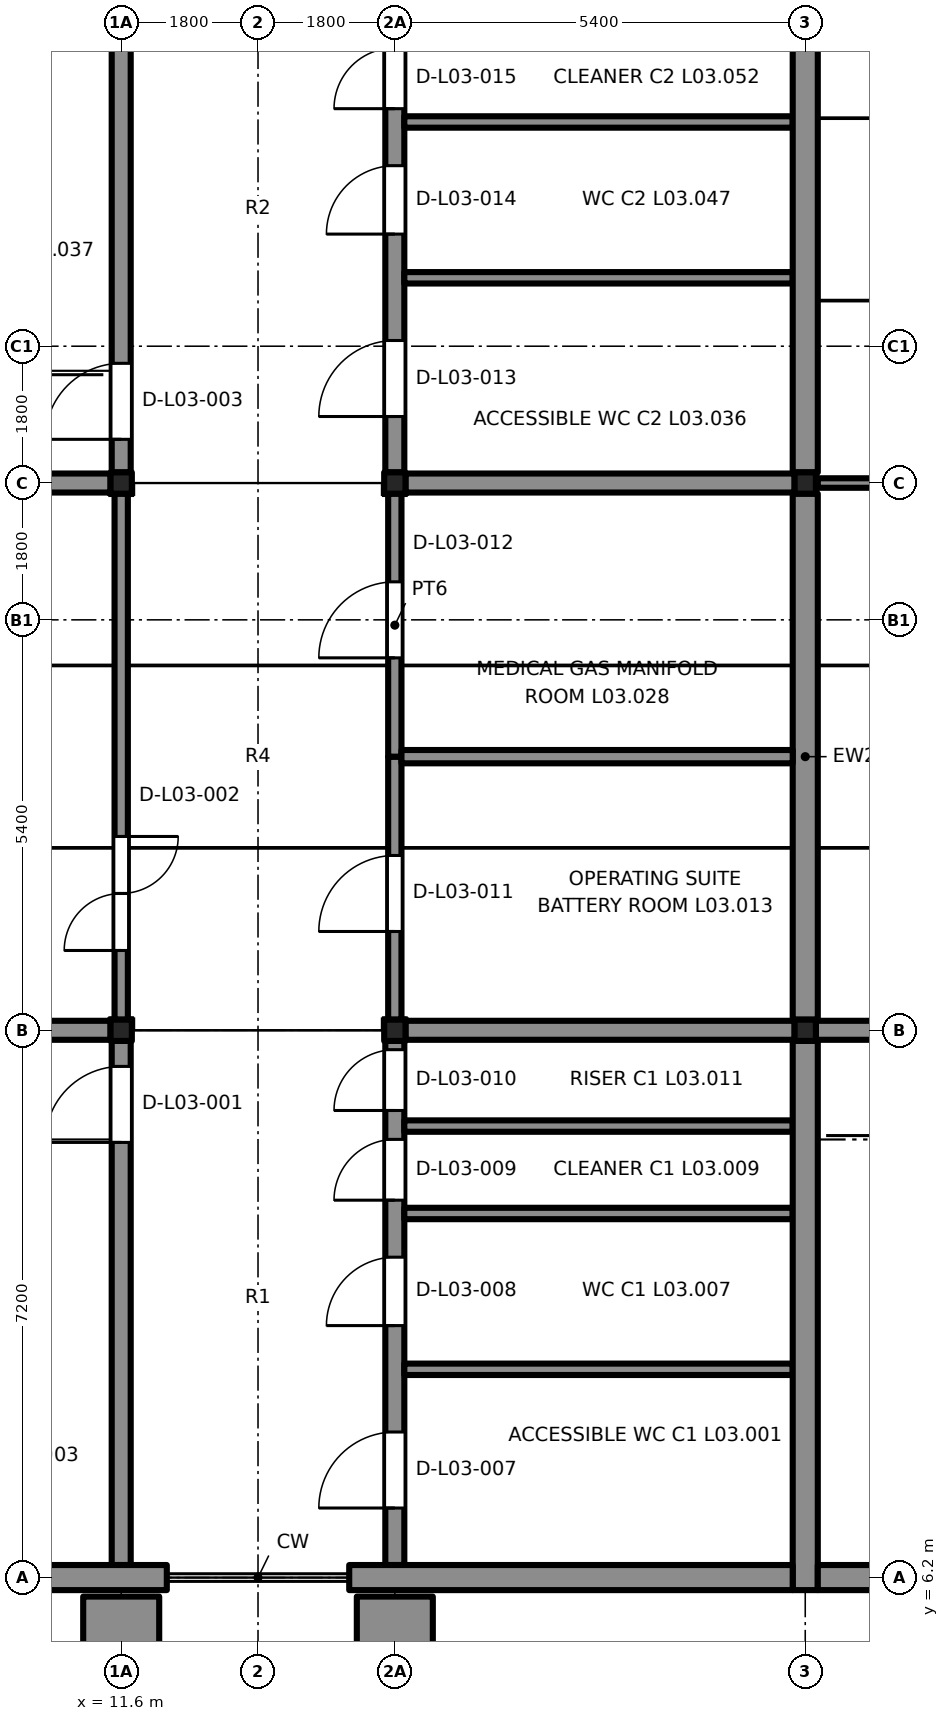
"""IFC4 building model, lengths in metres.
Left out: names, types, materials, properties, quantities, classifications, styles, units other than length and angle.
Written with IfcOpenShell. Run it as: python <this file> out.ifc"""

import sys

from ifc_helpers import new_model, si_unit, direction, frame, frame_2d, origin, origin_2d, place, context, subcontext, project, spatial, rectangle, extrude, element, fill, save


model = new_model("IFC4")
c1 = context("Model", 3, precision=1e-05, world=origin(), true_north=direction((0.0, 1.0)))
c2 = subcontext(c1, "Body", "Model", "MODEL_VIEW")
j1 = project(units=[si_unit("LENGTHUNIT", "METRE"), si_unit("PLANEANGLEUNIT", "RADIAN")], contexts=[c1])
p1 = place(None, origin())
s1 = spatial("IfcSite", under=j1, at=p1, CompositionType="ELEMENT")
p2 = place(p1, origin())
s2 = spatial("IfcBuilding", under=s1, at=p2, CompositionType="ELEMENT")
p3 = place(p2, frame((0.0, 0.0, 14.1)))
s3 = spatial("IfcBuildingStorey", under=s2, at=p3, CompositionType="ELEMENT", Elevation=14.1)
for number, where, z_axis, x_axis in (
    (1, (11.6, 13.4, 0.0), (0.0, 0.0, 1.0), (1.0, 0.0, 0.0)),
    (2, (15.2, 13.4, 0.0), (0.0, 0.0, 1.0), (1.0, 0.0, 0.0)),
    (3, (20.6, 13.4, 0.0), (0.0, 0.0, 1.0), (1.0, 0.0, 0.0)),
    (4, (11.6, 20.6, 0.0), (0.0, 0.0, 1.0), (1.0, 0.0, 0.0)),
    (5, (15.2, 20.6, 0.0), (0.0, 0.0, 1.0), (1.0, 0.0, 0.0)),
    (6, (20.6, 20.6, 0.0), (0.0, 0.0, 1.0), (1.0, 0.0, 0.0)),
):
    element("IfcColumn", number, at=place(p3, frame(where, z_axis=z_axis, x_axis=x_axis)), inside=s3, PredefinedType="COLUMN", context=c2, shape_type="SweptSolid", body=[
        extrude(rectangle(XDim=0.28, YDim=0.28, at=origin_2d()), origin(), (0.0, 0.0, 1.0), 3.9),
    ])
p4 = place(p3, frame((11.6, 6.365, 0.0), z_axis=(0.0, 0.0, 1.0), x_axis=(0.0, 1.0, 0.0)))
e7 = element("IfcWall", 7, at=p4, inside=s3, PredefinedType="SHEAR", context=c2, shape_type="SweptSolid", body=[
    extrude(rectangle(XDim=6.895, YDim=0.25, at=frame_2d((3.448, 0.0))), origin(), (0.0, 0.0, 1.0), 3.2),
])
p5 = place(p4, frame((5.56, 0.0, 0.0)))
e8 = element("IfcOpeningElement", 8, at=p5, cuts=e7, PredefinedType="OPENING", context=c2, shape_type="SweptSolid", body=[
    extrude(rectangle(XDim=1.0, YDim=2.1, at=frame_2d((0.5, 1.05))), frame((0.0, 0.135, 0.0), z_axis=(0.0, -1.0, 0.0), x_axis=(1.0, 0.0, 0.0)), (0.0, 0.0, 1.0), 0.27),
])
p6 = place(p3, frame((6.34, 13.4, 0.0), z_axis=(0.0, 0.0, 1.0), x_axis=(1.0, 0.0, 0.0)))
e9 = element("IfcWall", 9, at=p6, inside=s3, PredefinedType="SHEAR", context=c2, shape_type="SweptSolid", body=[
    extrude(rectangle(XDim=5.12, YDim=0.25, at=frame_2d((2.56, 0.0))), origin(), (0.0, 0.0, 1.0), 3.2),
])
p7 = place(p3, frame((15.2, 6.365, 0.0), z_axis=(0.0, 0.0, 1.0), x_axis=(0.0, 1.0, 0.0)))
e10 = element("IfcWall", 10, at=p7, inside=s3, PredefinedType="SHEAR", context=c2, shape_type="SweptSolid", body=[
    extrude(rectangle(XDim=6.895, YDim=0.25, at=frame_2d((3.448, 0.0))), origin(), (0.0, 0.0, 1.0), 3.2),
])
p8 = place(p7, frame((0.75, 0.0, 0.0)))
e11 = element("IfcOpeningElement", 11, at=p8, cuts=e10, PredefinedType="OPENING", context=c2, shape_type="SweptSolid", body=[
    extrude(rectangle(XDim=1.0, YDim=2.1, at=frame_2d((0.5, 1.05))), frame((0.0, 0.135, 0.0), z_axis=(0.0, -1.0, 0.0), x_axis=(1.0, 0.0, 0.0)), (0.0, 0.0, 1.0), 0.27),
])
p9 = place(p7, frame((3.15, 0.0, 0.0)))
e12 = element("IfcOpeningElement", 12, at=p9, cuts=e10, PredefinedType="OPENING", context=c2, shape_type="SweptSolid", body=[
    extrude(rectangle(XDim=0.9, YDim=2.1, at=frame_2d((0.45, 1.05))), frame((0.0, 0.135, 0.0), z_axis=(0.0, -1.0, 0.0), x_axis=(1.0, 0.0, 0.0)), (0.0, 0.0, 1.0), 0.27),
])
p10 = place(p7, frame((4.8, 0.0, 0.0)))
e13 = element("IfcOpeningElement", 13, at=p10, cuts=e10, PredefinedType="OPENING", context=c2, shape_type="SweptSolid", body=[
    extrude(rectangle(XDim=0.8, YDim=2.1, at=frame_2d((0.4, 1.05))), frame((0.0, 0.135, 0.0), z_axis=(0.0, -1.0, 0.0), x_axis=(1.0, 0.0, 0.0)), (0.0, 0.0, 1.0), 0.27),
])
p11 = place(p7, frame((5.98, 0.0, 0.0)))
e14 = element("IfcOpeningElement", 14, at=p11, cuts=e10, PredefinedType="OPENING", context=c2, shape_type="SweptSolid", body=[
    extrude(rectangle(XDim=0.8, YDim=2.1, at=frame_2d((0.4, 1.05))), frame((0.0, 0.135, 0.0), z_axis=(0.0, -1.0, 0.0), x_axis=(1.0, 0.0, 0.0)), (0.0, 0.0, 1.0), 0.27),
])
p12 = place(p3, frame((15.34, 13.4, 0.0), z_axis=(0.0, 0.0, 1.0), x_axis=(1.0, 0.0, 0.0)))
e15 = element("IfcWall", 15, at=p12, inside=s3, PredefinedType="SHEAR", context=c2, shape_type="SweptSolid", body=[
    extrude(rectangle(XDim=5.12, YDim=0.25, at=frame_2d((2.56, 0.0))), origin(), (0.0, 0.0, 1.0), 3.2),
])
for number, where, z_axis, x_axis in (
    (16, (15.325, 8.94, 0.0), (0.0, 0.0, 1.0), (1.0, 0.0, 0.0)),
    (17, (15.325, 10.99, 0.0), (0.0, 0.0, 1.0), (1.0, 0.0, 0.0)),
    (18, (15.325, 12.14, 0.0), (0.0, 0.0, 1.0), (1.0, 0.0, 0.0)),
):
    element("IfcWall", number, at=place(p3, frame(where, z_axis=z_axis, x_axis=x_axis)), inside=s3, PredefinedType="PARTITIONING", context=c2, shape_type="SweptSolid", body=[
        extrude(rectangle(XDim=5.11, YDim=0.15, at=frame_2d((2.555, 0.0))), origin(), (0.0, 0.0, 1.0), 3.2),
    ])
p13 = place(p3, frame((11.6, 20.74, 0.0), z_axis=(0.0, 0.0, 1.0), x_axis=(0.0, 1.0, 0.0)))
e19 = element("IfcWall", 19, at=p13, inside=s3, PredefinedType="SHEAR", context=c2, shape_type="SweptSolid", body=[
    extrude(rectangle(XDim=6.92, YDim=0.25, at=frame_2d((3.46, 0.0))), origin(), (0.0, 0.0, 1.0), 3.2),
])
p14 = place(p13, frame((0.435, 0.0, 0.0)))
e20 = element("IfcOpeningElement", 20, at=p14, cuts=e19, PredefinedType="OPENING", context=c2, shape_type="SweptSolid", body=[
    extrude(rectangle(XDim=1.0, YDim=2.1, at=frame_2d((0.5, 1.05))), frame((0.0, 0.135, 0.0), z_axis=(0.0, -1.0, 0.0), x_axis=(1.0, 0.0, 0.0)), (0.0, 0.0, 1.0), 0.27),
])
p15 = place(p3, frame((6.34, 20.6, 0.0), z_axis=(0.0, 0.0, 1.0), x_axis=(1.0, 0.0, 0.0)))
e21 = element("IfcWall", 21, at=p15, inside=s3, PredefinedType="SHEAR", context=c2, shape_type="SweptSolid", body=[
    extrude(rectangle(XDim=5.12, YDim=0.25, at=frame_2d((2.56, 0.0))), origin(), (0.0, 0.0, 1.0), 3.2),
])
p16 = place(p3, frame((15.2, 20.74, 0.0), z_axis=(0.0, 0.0, 1.0), x_axis=(0.0, 1.0, 0.0)))
e22 = element("IfcWall", 22, at=p16, inside=s3, PredefinedType="SHEAR", context=c2, shape_type="SweptSolid", body=[
    extrude(rectangle(XDim=6.92, YDim=0.25, at=frame_2d((3.46, 0.0))), origin(), (0.0, 0.0, 1.0), 3.2),
])
p17 = place(p16, frame((0.735, 0.0, 0.0)))
e23 = element("IfcOpeningElement", 23, at=p17, cuts=e22, PredefinedType="OPENING", context=c2, shape_type="SweptSolid", body=[
    extrude(rectangle(XDim=1.0, YDim=2.1, at=frame_2d((0.5, 1.05))), frame((0.0, 0.135, 0.0), z_axis=(0.0, -1.0, 0.0), x_axis=(1.0, 0.0, 0.0)), (0.0, 0.0, 1.0), 0.27),
])
p18 = place(p16, frame((3.135, 0.0, 0.0)))
e24 = element("IfcOpeningElement", 24, at=p18, cuts=e22, PredefinedType="OPENING", context=c2, shape_type="SweptSolid", body=[
    extrude(rectangle(XDim=0.9, YDim=2.1, at=frame_2d((0.45, 1.05))), frame((0.0, 0.135, 0.0), z_axis=(0.0, -1.0, 0.0), x_axis=(1.0, 0.0, 0.0)), (0.0, 0.0, 1.0), 0.27),
])
p19 = place(p16, frame((4.785, 0.0, 0.0)))
e25 = element("IfcOpeningElement", 25, at=p19, cuts=e22, PredefinedType="OPENING", context=c2, shape_type="SweptSolid", body=[
    extrude(rectangle(XDim=0.8, YDim=2.1, at=frame_2d((0.4, 1.05))), frame((0.0, 0.135, 0.0), z_axis=(0.0, -1.0, 0.0), x_axis=(1.0, 0.0, 0.0)), (0.0, 0.0, 1.0), 0.27),
])
p20 = place(p16, frame((5.985, 0.0, 0.0)))
e26 = element("IfcOpeningElement", 26, at=p20, cuts=e22, PredefinedType="OPENING", context=c2, shape_type="SweptSolid", body=[
    extrude(rectangle(XDim=0.8, YDim=2.1, at=frame_2d((0.4, 1.05))), frame((0.0, 0.135, 0.0), z_axis=(0.0, -1.0, 0.0), x_axis=(1.0, 0.0, 0.0)), (0.0, 0.0, 1.0), 0.27),
])
p21 = place(p3, frame((15.34, 20.6, 0.0), z_axis=(0.0, 0.0, 1.0), x_axis=(1.0, 0.0, 0.0)))
e27 = element("IfcWall", 27, at=p21, inside=s3, PredefinedType="SHEAR", context=c2, shape_type="SweptSolid", body=[
    extrude(rectangle(XDim=5.12, YDim=0.25, at=frame_2d((2.56, 0.0))), origin(), (0.0, 0.0, 1.0), 3.2),
])
for number, where, z_axis, x_axis in (
    (28, (15.325, 23.3, 0.0), (0.0, 0.0, 1.0), (1.0, 0.0, 0.0)),
    (29, (15.325, 25.35, 0.0), (0.0, 0.0, 1.0), (1.0, 0.0, 0.0)),
):
    element("IfcWall", number, at=place(p3, frame(where, z_axis=z_axis, x_axis=x_axis)), inside=s3, PredefinedType="PARTITIONING", context=c2, shape_type="SweptSolid", body=[
        extrude(rectangle(XDim=5.11, YDim=0.15, at=frame_2d((2.555, 0.0))), origin(), (0.0, 0.0, 1.0), 3.2),
    ])
p22 = place(p3, frame((20.74, 13.4, 0.0), z_axis=(0.0, 0.0, 1.0), x_axis=(1.0, 0.0, 0.0)))
e30 = element("IfcWall", 30, at=p22, inside=s3, PredefinedType="SHEAR", context=c2, shape_type="SweptSolid", body=[
    extrude(rectangle(XDim=5.12, YDim=0.25, at=frame_2d((2.56, 0.0))), origin(), (0.0, 0.0, 1.0), 3.2),
])
p23 = place(p3, frame((20.6, 13.26, 0.0), z_axis=(0.0, 0.0, 1.0), x_axis=(0.0, -1.0, 0.0)))
e31 = element("IfcWall", 31, at=p23, inside=s3, PredefinedType="SOLIDWALL", context=c2, shape_type="SweptSolid", body=[
    extrude(rectangle(XDim=7.225, YDim=0.33, at=frame_2d((3.613, 0.0))), origin(), (0.0, 0.0, 1.0), 3.2),
])
for number, where, z_axis, x_axis in (
    (32, (20.6, 20.46, 0.0), (0.0, 0.0, 1.0), (0.0, -1.0, 0.0)),
    (33, (20.6, 27.66, 0.0), (0.0, 0.0, 1.0), (0.0, -1.0, 0.0)),
):
    element("IfcWall", number, at=place(p3, frame(where, z_axis=z_axis, x_axis=x_axis)), inside=s3, PredefinedType="SOLIDWALL", context=c2, shape_type="SweptSolid", body=[
        extrude(rectangle(XDim=6.92, YDim=0.33, at=frame_2d((3.46, 0.0))), origin(), (0.0, 0.0, 1.0), 3.2),
    ])
p24 = place(p3, frame((12.2, 6.2, 0.0), z_axis=(0.0, 0.0, 1.0), x_axis=(-1.0, 0.0, 0.0)))
e34 = element("IfcWall", 34, at=p24, inside=s3, PredefinedType="SOLIDWALL", context=c2, shape_type="SweptSolid", body=[
    extrude(rectangle(XDim=2.68, YDim=0.33, at=frame_2d((1.34, 0.0))), origin(), (0.0, 0.0, 1.0), 3.2),
])
p25 = place(p3, frame((20.435, 6.2, 0.0), z_axis=(0.0, 0.0, 1.0), x_axis=(-1.0, 0.0, 0.0)))
e35 = element("IfcWall", 35, at=p25, inside=s3, PredefinedType="SOLIDWALL", context=c2, shape_type="SweptSolid", body=[
    extrude(rectangle(XDim=5.835, YDim=0.33, at=frame_2d((2.917, 0.0))), origin(), (0.0, 0.0, 1.0), 3.2),
])
for number, where, z_axis, x_axis in (
    (36, (12.1, 5.575, 0.0), (0.0, 0.0, 1.0), (-1.0, 0.0, 0.0)),
    (37, (15.7, 5.575, 0.0), (0.0, 0.0, 1.0), (-1.0, 0.0, 0.0)),
):
    element("IfcWall", number, at=place(p3, frame(where, z_axis=z_axis, x_axis=x_axis)), inside=s3, PredefinedType="SOLIDWALL", context=c2, shape_type="SweptSolid", body=[
        extrude(rectangle(XDim=1.0, YDim=0.75, at=frame_2d((0.5, 0.0))), origin(), (0.0, 0.0, 1.0), 3.9),
    ])
p26 = place(p3, frame((11.9, 6.25, 3.6), z_axis=(0.0, 0.0, 1.0), x_axis=(-1.0, 0.0, 0.0)))
e38 = element("IfcWall", 38, at=p26, inside=s3, PredefinedType="SOLIDWALL", context=c2, shape_type="SweptSolid", body=[
    extrude(rectangle(XDim=1.5, YDim=0.23, at=frame_2d((0.75, 0.0))), origin(), (0.0, 0.0, 1.0), 2.7),
])
for number, where, z_axis, x_axis in (
    (39, (13.4, 6.25, 3.6), (0.0, 0.0, 1.0), (-1.0, 0.0, 0.0)),
    (40, (14.9, 6.25, 3.6), (0.0, 0.0, 1.0), (-1.0, 0.0, 0.0)),
):
    element("IfcWall", number, at=place(p3, frame(where, z_axis=z_axis, x_axis=x_axis)), inside=s3, PredefinedType="SOLIDWALL", context=c2, shape_type="SweptSolid", body=[
        extrude(rectangle(XDim=1.5, YDim=0.23, at=frame_2d((0.75, 0.0))), origin(), (0.0, 0.0, 1.0), 1.7),
    ])
p27 = place(p3, frame((16.4, 6.25, 3.6), z_axis=(0.0, 0.0, 1.0), x_axis=(-1.0, 0.0, 0.0)))
e41 = element("IfcWall", 41, at=p27, inside=s3, PredefinedType="SOLIDWALL", context=c2, shape_type="SweptSolid", body=[
    extrude(rectangle(XDim=1.5, YDim=0.23, at=frame_2d((0.75, 0.0))), origin(), (0.0, 0.0, 1.0), 2.7),
])
p28 = place(p3, frame((17.6, 6.25, 3.6), z_axis=(0.0, 0.0, 1.0), x_axis=(-1.0, 0.0, 0.0)))
e42 = element("IfcWall", 42, at=p28, inside=s3, PredefinedType="SOLIDWALL", context=c2, shape_type="SweptSolid", body=[
    extrude(rectangle(XDim=1.2, YDim=0.23, at=frame_2d((0.6, 0.0))), origin(), (0.0, 0.0, 1.0), 3.7),
])
p29 = place(p3, frame((19.1, 6.25, 3.6), z_axis=(0.0, 0.0, 1.0), x_axis=(-1.0, 0.0, 0.0)))
e43 = element("IfcWall", 43, at=p29, inside=s3, PredefinedType="SOLIDWALL", context=c2, shape_type="SweptSolid", body=[
    extrude(rectangle(XDim=1.5, YDim=0.23, at=frame_2d((0.75, 0.0))), origin(), (0.0, 0.0, 1.0), 2.7),
])
p30 = place(p3, frame((22.72, 6.2, 0.0), z_axis=(0.0, 0.0, 1.0), x_axis=(-1.0, 0.0, 0.0)))
e44 = element("IfcWall", 44, at=p30, inside=s3, PredefinedType="SOLIDWALL", context=c2, shape_type="SweptSolid", body=[
    extrude(rectangle(XDim=1.955, YDim=0.33, at=frame_2d((0.978, 0.0))), origin(), (0.0, 0.0, 1.0), 3.2),
])
p31 = place(p3, frame((11.6, 13.54, 0.0), z_axis=(0.0, 0.0, 1.0), x_axis=(0.0, 1.0, 0.0)))
e45 = element("IfcWall", 45, at=p31, inside=s3, PredefinedType="PARTITIONING", context=c2, shape_type="SweptSolid", body=[
    extrude(rectangle(XDim=6.92, YDim=0.175, at=frame_2d((3.46, 0.0))), origin(), (0.0, 0.0, 1.0), 5.485),
])
p32 = place(p31, frame((0.91, 0.0, 0.0)))
e46 = element("IfcOpeningElement", 46, at=p32, cuts=e45, PredefinedType="OPENING", context=c2, shape_type="SweptSolid", body=[
    extrude(rectangle(XDim=1.5, YDim=2.1, at=frame_2d((0.75, 1.05))), frame((0.0, 0.097, 0.0), z_axis=(0.0, -1.0, 0.0), x_axis=(1.0, 0.0, 0.0)), (0.0, 0.0, 1.0), 0.195),
])
p33 = place(p3, frame((15.2, 13.54, 0.0), z_axis=(0.0, 0.0, 1.0), x_axis=(0.0, 1.0, 0.0)))
e47 = element("IfcWall", 47, at=p33, inside=s3, PredefinedType="PARTITIONING", context=c2, shape_type="SweptSolid", body=[
    extrude(rectangle(XDim=3.46, YDim=0.175, at=frame_2d((1.73, 0.0))), origin(), (0.0, 0.0, 1.0), 5.485),
])
p34 = place(p33, frame((1.16, 0.0, 0.0)))
e48 = element("IfcOpeningElement", 48, at=p34, cuts=e47, PredefinedType="OPENING", context=c2, shape_type="SweptSolid", body=[
    extrude(rectangle(XDim=1.0, YDim=2.1, at=frame_2d((0.5, 1.05))), frame((0.0, 0.097, 0.0), z_axis=(0.0, -1.0, 0.0), x_axis=(1.0, 0.0, 0.0)), (0.0, 0.0, 1.0), 0.195),
])
p35 = place(p3, frame((15.2, 17.0, 0.0), z_axis=(0.0, 0.0, 1.0), x_axis=(0.0, 1.0, 0.0)))
e49 = element("IfcWall", 49, at=p35, inside=s3, PredefinedType="PARTITIONING", context=c2, shape_type="SweptSolid", body=[
    extrude(rectangle(XDim=3.46, YDim=0.175, at=frame_2d((1.73, 0.0))), origin(), (0.0, 0.0, 1.0), 5.485),
])
p36 = place(p35, frame((1.3, 0.0, 0.0)))
e50 = element("IfcOpeningElement", 50, at=p36, cuts=e49, PredefinedType="OPENING", context=c2, shape_type="SweptSolid", body=[
    extrude(rectangle(XDim=1.0, YDim=2.1, at=frame_2d((0.5, 1.05))), frame((0.0, 0.097, 0.0), z_axis=(0.0, -1.0, 0.0), x_axis=(1.0, 0.0, 0.0)), (0.0, 0.0, 1.0), 0.195),
])
p37 = place(p3, frame((20.435, 17.0, 0.0), z_axis=(0.0, 0.0, 1.0), x_axis=(-1.0, 0.0, 0.0)))
e51 = element("IfcWall", 51, at=p37, inside=s3, PredefinedType="PARTITIONING", context=c2, shape_type="SweptSolid", body=[
    extrude(rectangle(XDim=5.147, YDim=0.175, at=frame_2d((2.574, 0.0))), origin(), (0.0, 0.0, 1.0), 5.485),
])
p38 = place(p3, frame((20.765, 20.6, 0.0), z_axis=(0.0, 0.0, 1.0), x_axis=(1.0, 0.0, 0.0)))
e52 = element("IfcWall", 52, at=p38, inside=s3, PredefinedType="PARTITIONING", context=c2, shape_type="SweptSolid", body=[
    extrude(rectangle(XDim=5.095, YDim=0.125, at=frame_2d((2.548, 0.0))), origin(), (0.0, 0.0, 1.0), 3.9),
])
p39 = place(p5, origin())
e53 = element("IfcDoor", 53, at=p39, inside=s3, OperationType="SINGLE_SWING_LEFT", PredefinedType="DOOR", context=c2, shape_type="SweptSolid", body=[
    extrude(rectangle(XDim=1.0, YDim=2.1, at=frame_2d((0.5, 1.05))), frame((0.0, 0.025, 0.0), z_axis=(0.0, -1.0, 0.0), x_axis=(1.0, 0.0, 0.0)), (0.0, 0.0, 1.0), 0.05),
])
fill(e8, e53)
p40 = place(p8, origin())
e54 = element("IfcDoor", 54, at=p40, inside=s3, OperationType="SINGLE_SWING_LEFT", PredefinedType="DOOR", context=c2, shape_type="SweptSolid", body=[
    extrude(rectangle(XDim=1.0, YDim=2.1, at=frame_2d((0.5, 1.05))), frame((0.0, 0.025, 0.0), z_axis=(0.0, -1.0, 0.0), x_axis=(1.0, 0.0, 0.0)), (0.0, 0.0, 1.0), 0.05),
])
fill(e11, e54)
p41 = place(p9, origin())
e55 = element("IfcDoor", 55, at=p41, inside=s3, OperationType="SINGLE_SWING_LEFT", PredefinedType="DOOR", context=c2, shape_type="SweptSolid", body=[
    extrude(rectangle(XDim=0.9, YDim=2.1, at=frame_2d((0.45, 1.05))), frame((0.0, 0.025, 0.0), z_axis=(0.0, -1.0, 0.0), x_axis=(1.0, 0.0, 0.0)), (0.0, 0.0, 1.0), 0.05),
])
fill(e12, e55)
p42 = place(p10, origin())
e56 = element("IfcDoor", 56, at=p42, inside=s3, OperationType="SINGLE_SWING_LEFT", PredefinedType="DOOR", context=c2, shape_type="SweptSolid", body=[
    extrude(rectangle(XDim=0.8, YDim=2.1, at=frame_2d((0.4, 1.05))), frame((0.0, 0.025, 0.0), z_axis=(0.0, -1.0, 0.0), x_axis=(1.0, 0.0, 0.0)), (0.0, 0.0, 1.0), 0.05),
])
fill(e13, e56)
p43 = place(p11, origin())
e57 = element("IfcDoor", 57, at=p43, inside=s3, OperationType="SINGLE_SWING_LEFT", PredefinedType="DOOR", context=c2, shape_type="SweptSolid", body=[
    extrude(rectangle(XDim=0.8, YDim=2.1, at=frame_2d((0.4, 1.05))), frame((0.0, 0.025, 0.0), z_axis=(0.0, -1.0, 0.0), x_axis=(1.0, 0.0, 0.0)), (0.0, 0.0, 1.0), 0.05),
])
fill(e14, e57)
p44 = place(p14, origin())
e58 = element("IfcDoor", 58, at=p44, inside=s3, OperationType="SINGLE_SWING_RIGHT", PredefinedType="DOOR", context=c2, shape_type="SweptSolid", body=[
    extrude(rectangle(XDim=1.0, YDim=2.1, at=frame_2d((0.5, 1.05))), frame((0.0, 0.025, 0.0), z_axis=(0.0, -1.0, 0.0), x_axis=(1.0, 0.0, 0.0)), (0.0, 0.0, 1.0), 0.05),
])
fill(e20, e58)
p45 = place(p17, origin())
e59 = element("IfcDoor", 59, at=p45, inside=s3, OperationType="SINGLE_SWING_LEFT", PredefinedType="DOOR", context=c2, shape_type="SweptSolid", body=[
    extrude(rectangle(XDim=1.0, YDim=2.1, at=frame_2d((0.5, 1.05))), frame((0.0, 0.025, 0.0), z_axis=(0.0, -1.0, 0.0), x_axis=(1.0, 0.0, 0.0)), (0.0, 0.0, 1.0), 0.05),
])
fill(e23, e59)
p46 = place(p18, origin())
e60 = element("IfcDoor", 60, at=p46, inside=s3, OperationType="SINGLE_SWING_LEFT", PredefinedType="DOOR", context=c2, shape_type="SweptSolid", body=[
    extrude(rectangle(XDim=0.9, YDim=2.1, at=frame_2d((0.45, 1.05))), frame((0.0, 0.025, 0.0), z_axis=(0.0, -1.0, 0.0), x_axis=(1.0, 0.0, 0.0)), (0.0, 0.0, 1.0), 0.05),
])
fill(e24, e60)
p47 = place(p19, origin())
e61 = element("IfcDoor", 61, at=p47, inside=s3, OperationType="SINGLE_SWING_LEFT", PredefinedType="DOOR", context=c2, shape_type="SweptSolid", body=[
    extrude(rectangle(XDim=0.8, YDim=2.1, at=frame_2d((0.4, 1.05))), frame((0.0, 0.025, 0.0), z_axis=(0.0, -1.0, 0.0), x_axis=(1.0, 0.0, 0.0)), (0.0, 0.0, 1.0), 0.05),
])
fill(e25, e61)
p48 = place(p32, origin())
e62 = element("IfcDoor", 62, at=p48, inside=s3, OperationType="DOUBLE_DOOR_SINGLE_SWING", PredefinedType="DOOR", context=c2, shape_type="SweptSolid", body=[
    extrude(rectangle(XDim=1.5, YDim=2.1, at=frame_2d((0.75, 1.05))), frame((0.0, 0.025, 0.0), z_axis=(0.0, -1.0, 0.0), x_axis=(1.0, 0.0, 0.0)), (0.0, 0.0, 1.0), 0.05),
])
fill(e46, e62)
p49 = place(p34, origin())
e63 = element("IfcDoor", 63, at=p49, inside=s3, OperationType="SINGLE_SWING_LEFT", PredefinedType="DOOR", context=c2, shape_type="SweptSolid", body=[
    extrude(rectangle(XDim=1.0, YDim=2.1, at=frame_2d((0.5, 1.05))), frame((0.0, 0.025, 0.0), z_axis=(0.0, -1.0, 0.0), x_axis=(1.0, 0.0, 0.0)), (0.0, 0.0, 1.0), 0.05),
])
fill(e48, e63)
p50 = place(p36, origin())
e64 = element("IfcDoor", 64, at=p50, inside=s3, OperationType="SINGLE_SWING_RIGHT", PredefinedType="DOOR", context=c2, shape_type="SweptSolid", body=[
    extrude(rectangle(XDim=1.0, YDim=2.1, at=frame_2d((0.5, 1.05))), frame((0.0, 0.025, 0.0), z_axis=(0.0, -1.0, 0.0), x_axis=(1.0, 0.0, 0.0)), (0.0, 0.0, 1.0), 0.05),
])
fill(e50, e64)
save(model, sys.argv[1])
